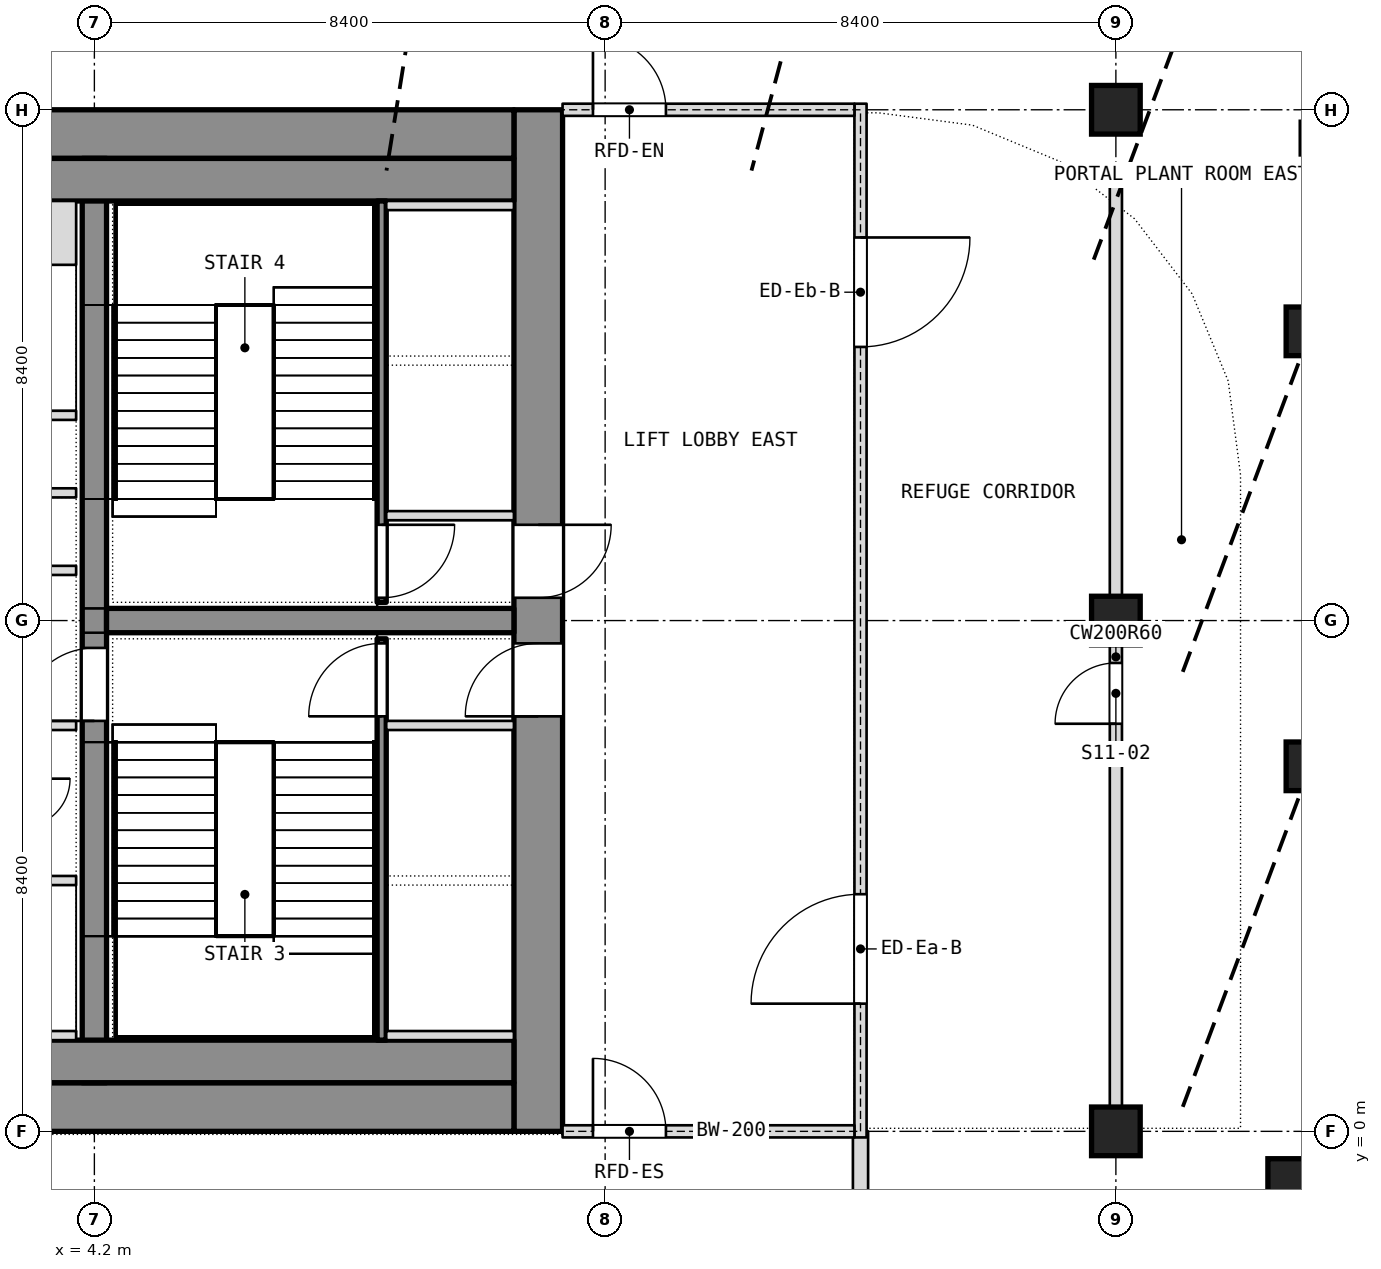
"""IFC4 building model, lengths in metres.
Left out: names, types, materials, properties, quantities, classifications, styles, units other than length and angle.
Written with IfcOpenShell. Run it as: python <this file> out.ifc"""

import sys

from ifc_helpers import new_model, si_unit, direction, frame, frame_2d, origin, origin_2d, place, context, subcontext, project, spatial, rectangle, i_section, extrude, element, fill, save


model = new_model("IFC4")
c1 = context("Model", 3, precision=1e-05, world=origin(), true_north=direction((0.0, 1.0)))
c2 = subcontext(c1, "Body", "Model", "MODEL_VIEW")
j1 = project(units=[si_unit("LENGTHUNIT", "METRE"), si_unit("PLANEANGLEUNIT", "RADIAN")], contexts=[c1])
p1 = place(None, origin())
s1 = spatial("IfcSite", under=j1, at=p1, CompositionType="ELEMENT")
p2 = place(p1, origin())
s2 = spatial("IfcBuilding", under=s1, at=p2, CompositionType="ELEMENT")
p3 = place(p2, frame((0.0, 0.0, 252.5)))
s3 = spatial("IfcBuildingStorey", under=s2, at=p3, CompositionType="ELEMENT", Elevation=252.5)
p4 = place(p3, frame((11.5, 0.0, 0.0), z_axis=(0.0, 0.0, 1.0), x_axis=(0.0, 1.0, 0.0)))
e1 = element("IfcWall", 1, at=p4, inside=s3, PredefinedType="SHEAR", context=c2, shape_type="SweptSolid", body=[
    extrude(rectangle(XDim=16.8, YDim=0.8, at=frame_2d((8.4, 0.0))), origin(), (0.0, 0.0, 1.0), 14.4),
])
p5 = place(p4, frame((6.825, 0.0, 0.0)))
e2 = element("IfcOpeningElement", 2, at=p5, cuts=e1, PredefinedType="OPENING", context=c2, shape_type="SweptSolid", body=[
    extrude(rectangle(XDim=1.2, YDim=2.1, at=frame_2d((0.6, 1.05))), frame((0.0, 0.4, 0.0), z_axis=(0.0, -1.0, 0.0), x_axis=(1.0, 0.0, 0.0)), (0.0, 0.0, 1.0), 0.8),
])
p6 = place(p4, frame((8.775, 0.0, 0.0)))
e3 = element("IfcOpeningElement", 3, at=p6, cuts=e1, PredefinedType="OPENING", context=c2, shape_type="SweptSolid", body=[
    extrude(rectangle(XDim=1.2, YDim=2.1, at=frame_2d((0.6, 1.05))), frame((0.0, 0.4, 0.0), z_axis=(0.0, -1.0, 0.0), x_axis=(1.0, 0.0, 0.0)), (0.0, 0.0, 1.0), 0.8),
])
p7 = place(p3, frame((-11.1, 0.4, 0.0), z_axis=(0.0, 0.0, 1.0), x_axis=(1.0, 0.0, 0.0)))
e4 = element("IfcWall", 4, at=p7, inside=s3, PredefinedType="SHEAR", context=c2, shape_type="SweptSolid", body=[
    extrude(rectangle(XDim=22.2, YDim=0.8, at=frame_2d((11.1, 0.0))), origin(), (0.0, 0.0, 1.0), 14.4),
])
p8 = place(p7, frame((10.85, 0.0, 0.0)))
e5 = element("IfcOpeningElement", 5, at=p8, cuts=e4, PredefinedType="OPENING", context=c2, shape_type="SweptSolid", body=[
    extrude(rectangle(XDim=1.4, YDim=2.1, at=frame_2d((0.7, 1.05))), frame((0.0, 0.4, 0.0), z_axis=(0.0, -1.0, 0.0), x_axis=(1.0, 0.0, 0.0)), (0.0, 0.0, 1.0), 0.8),
])
p9 = place(p3, frame((-11.1, 16.4, 0.0), z_axis=(0.0, 0.0, 1.0), x_axis=(1.0, 0.0, 0.0)))
e6 = element("IfcWall", 6, at=p9, inside=s3, PredefinedType="SHEAR", context=c2, shape_type="SweptSolid", body=[
    extrude(rectangle(XDim=22.2, YDim=0.8, at=frame_2d((11.1, 0.0))), origin(), (0.0, 0.0, 1.0), 14.4),
])
p10 = place(p9, frame((10.4, 0.0, 0.0)))
e7 = element("IfcOpeningElement", 7, at=p10, cuts=e6, PredefinedType="OPENING", context=c2, shape_type="SweptSolid", body=[
    extrude(rectangle(XDim=1.4, YDim=2.1, at=frame_2d((0.7, 1.05))), frame((0.0, 0.4, 0.0), z_axis=(0.0, -1.0, 0.0), x_axis=(1.0, 0.0, 0.0)), (0.0, 0.0, 1.0), 0.8),
])
p11 = place(p3, frame((4.2, 0.8, 0.0), z_axis=(0.0, 0.0, 1.0), x_axis=(0.0, 1.0, 0.0)))
e8 = element("IfcWall", 8, at=p11, inside=s3, PredefinedType="SHEAR", context=c2, shape_type="SweptSolid", body=[
    extrude(rectangle(XDim=15.2, YDim=0.4, at=frame_2d((7.6, 0.0))), origin(), (0.0, 0.0, 1.0), 14.4),
])
p12 = place(p11, frame((5.95, 0.0, 0.0)))
e9 = element("IfcOpeningElement", 9, at=p12, cuts=e8, PredefinedType="OPENING", context=c2, shape_type="SweptSolid", body=[
    extrude(rectangle(XDim=1.2, YDim=2.1, at=frame_2d((0.6, 1.05))), frame((0.0, 0.2, 0.0), z_axis=(0.0, -1.0, 0.0), x_axis=(1.0, 0.0, 0.0)), (0.0, 0.0, 1.0), 0.4),
])
p13 = place(p3, frame((4.4, 8.4, 0.0), z_axis=(0.0, 0.0, 1.0), x_axis=(1.0, 0.0, 0.0)))
e10 = element("IfcWall", 10, at=p13, inside=s3, PredefinedType="SHEAR", context=c2, shape_type="SweptSolid", body=[
    extrude(rectangle(XDim=6.7, YDim=0.4, at=frame_2d((3.35, 0.0))), origin(), (0.0, 0.0, 1.0), 14.4),
])
for number, where, z_axis, x_axis in (
    (11, (21.0, 0.0, 0.0), (0.0, 0.0, 1.0), (1.0, 0.0, 0.0)),
    (12, (21.0, 8.4, 0.0), (0.0, 0.0, 1.0), (1.0, 0.0, 0.0)),
    (13, (21.0, 16.8, 0.0), (0.0, 0.0, 1.0), (1.0, 0.0, 0.0)),
):
    element("IfcColumn", number, at=place(p3, frame(where, z_axis=z_axis, x_axis=x_axis)), inside=s3, PredefinedType="COLUMN", context=c2, shape_type="SweptSolid", body=[
        extrude(rectangle(XDim=0.8, YDim=0.8, at=origin_2d()), origin(), (0.0, 0.0, 1.0), 14.14),
    ])
p14 = place(p3, frame((24.2, 16.334, -0.3), z_axis=(0.0, 0.0, 1.0), x_axis=(1.0, 0.0, 0.0)))
e14 = element("IfcColumn", 14, at=p14, inside=s3, PredefinedType="COLUMN", context=c2, shape_type="SweptSolid", body=[
    extrude(i_section(OverallWidth=0.306, OverallDepth=0.524, WebThickness=0.024, FlangeThickness=0.04, FilletRadius=0.027, at=origin_2d()), origin(), (0.0, 0.0, 1.0), 14.04),
])
for number, where, z_axis, x_axis in (
    (15, (24.2, 13.156, 0.0), (0.0, 0.0, 1.0), (1.0, 0.0, 0.0)),
    (16, (24.2, 6.003, 0.0), (0.0, 0.0, 1.0), (1.0, 0.0, 0.0)),
    (17, (24.2, -1.15, 0.0), (0.0, 0.0, 1.0), (1.0, 0.0, 0.0)),
):
    element("IfcColumn", number, at=place(p3, frame(where, z_axis=z_axis, x_axis=x_axis)), inside=s3, PredefinedType="COLUMN", context=c2, shape_type="SweptSolid", body=[
        extrude(i_section(OverallWidth=0.306, OverallDepth=0.524, WebThickness=0.024, FlangeThickness=0.04, FilletRadius=0.027, at=origin_2d()), origin(), (0.0, 0.0, 1.0), 13.74),
    ])
p15 = place(p3, frame((21.0, 0.0, 0.0), z_axis=(0.0, 0.0, 1.0), x_axis=(0.0, 1.0, 0.0)))
e18 = element("IfcWall", 18, at=p15, inside=s3, PredefinedType="PARTITIONING", context=c2, shape_type="SweptSolid", body=[
    extrude(rectangle(XDim=15.606, YDim=0.2, at=frame_2d((7.803, 0.0))), origin(), (0.0, 0.0, 1.0), 13.74),
])
p16 = place(p15, frame((6.703, 0.0, 0.0)))
e19 = element("IfcOpeningElement", 19, at=p16, cuts=e18, PredefinedType="OPENING", context=c2, shape_type="SweptSolid", body=[
    extrude(rectangle(XDim=1.0, YDim=2.1, at=frame_2d((0.5, 1.05))), frame((0.0, 0.1, 0.0), z_axis=(0.0, -1.0, 0.0), x_axis=(1.0, 0.0, 0.0)), (0.0, 0.0, 1.0), 0.2),
])
p17 = place(p3, frame((16.8, 0.0, 0.0), z_axis=(0.0, 0.0, 1.0), x_axis=(0.0, -1.0, 0.0)))
e20 = element("IfcWall", 20, at=p17, inside=s3, PredefinedType="SOLIDWALL", context=c2, shape_type="SweptSolid", body=[
    extrude(rectangle(XDim=14.0, YDim=0.25, at=frame_2d((7.0, 0.0))), origin(), (0.0, 0.0, 1.0), 14.14),
])
p18 = place(p17, frame((1.467, 0.0, 1.0)))
e21 = element("IfcOpeningElement", 21, at=p18, cuts=e20, PredefinedType="OPENING", context=c2, shape_type="SweptSolid", body=[
    extrude(rectangle(XDim=4.8, YDim=3.0, at=frame_2d((2.4, 1.5))), frame((0.0, 0.125, 0.0), z_axis=(0.0, -1.0, 0.0), x_axis=(1.0, 0.0, 0.0)), (0.0, 0.0, 1.0), 0.25),
])
p19 = place(p17, frame((7.733, 0.0, 1.0)))
e22 = element("IfcOpeningElement", 22, at=p19, cuts=e20, PredefinedType="OPENING", context=c2, shape_type="SweptSolid", body=[
    extrude(rectangle(XDim=4.8, YDim=3.0, at=frame_2d((2.4, 1.5))), frame((0.0, 0.125, 0.0), z_axis=(0.0, -1.0, 0.0), x_axis=(1.0, 0.0, 0.0)), (0.0, 0.0, 1.0), 0.25),
])
p20 = place(p3, frame((1.15, 1.15, 0.0), z_axis=(0.0, 0.0, 1.0), x_axis=(1.0, 0.0, 0.0)))
e23 = element("IfcWall", 23, at=p20, inside=s3, PredefinedType="PARTITIONING", context=c2, shape_type="SweptSolid", body=[
    extrude(rectangle(XDim=9.95, YDim=0.7, at=frame_2d((4.975, 0.0))), origin(), (0.0, 0.0, 1.0), 14.14),
])
p21 = place(p3, frame((0.9, 15.65, 0.0), z_axis=(0.0, 0.0, 1.0), x_axis=(1.0, 0.0, 0.0)))
e24 = element("IfcWall", 24, at=p21, inside=s3, PredefinedType="PARTITIONING", context=c2, shape_type="SweptSolid", body=[
    extrude(rectangle(XDim=10.2, YDim=0.7, at=frame_2d((5.1, 0.0))), origin(), (0.0, 0.0, 1.0), 14.14),
])
p22 = place(p3, frame((8.925, 1.5, 0.0), z_axis=(0.0, 0.0, 1.0), x_axis=(0.0, 1.0, 0.0)))
e25 = element("IfcWall", 25, at=p22, inside=s3, PredefinedType="SHEAR", context=c2, shape_type="SweptSolid", body=[
    extrude(rectangle(XDim=6.6, YDim=0.15, at=frame_2d((3.3, 0.0))), origin(), (0.0, 0.0, 1.0), 14.14),
])
p23 = place(p22, frame((5.325, 0.0, 0.0)))
e26 = element("IfcOpeningElement", 26, at=p23, cuts=e25, PredefinedType="OPENING", context=c2, shape_type="SweptSolid", body=[
    extrude(rectangle(XDim=1.2, YDim=2.1, at=frame_2d((0.6, 1.05))), frame((0.0, 0.075, 0.0), z_axis=(0.0, -1.0, 0.0), x_axis=(1.0, 0.0, 0.0)), (0.0, 0.0, 1.0), 0.15),
])
for number, where, z_axis, x_axis in (
    (27, (9.0, 6.675, 0.0), (0.0, 0.0, 1.0), (1.0, 0.0, 0.0)),
    (28, (9.0, 1.575, 0.0), (0.0, 0.0, 1.0), (1.0, 0.0, 0.0)),
):
    element("IfcWall", number, at=place(p3, frame(where, z_axis=z_axis, x_axis=x_axis)), inside=s3, PredefinedType="SHEAR", context=c2, shape_type="SweptSolid", body=[
        extrude(rectangle(XDim=2.1, YDim=0.15, at=frame_2d((1.05, 0.0))), origin(), (0.0, 0.0, 1.0), 14.4),
    ])
p24 = place(p3, frame((8.925, 8.7, 0.0), z_axis=(0.0, 0.0, 1.0), x_axis=(0.0, 1.0, 0.0)))
e29 = element("IfcWall", 29, at=p24, inside=s3, PredefinedType="SHEAR", context=c2, shape_type="SweptSolid", body=[
    extrude(rectangle(XDim=6.6, YDim=0.15, at=frame_2d((3.3, 0.0))), origin(), (0.0, 0.0, 1.0), 14.14),
])
p25 = place(p24, frame((0.075, 0.0, 0.0)))
e30 = element("IfcOpeningElement", 30, at=p25, cuts=e29, PredefinedType="OPENING", context=c2, shape_type="SweptSolid", body=[
    extrude(rectangle(XDim=1.2, YDim=2.1, at=frame_2d((0.6, 1.05))), frame((0.0, 0.075, 0.0), z_axis=(0.0, -1.0, 0.0), x_axis=(1.0, 0.0, 0.0)), (0.0, 0.0, 1.0), 0.15),
])
for number, where, z_axis, x_axis in (
    (31, (9.0, 10.125, 0.0), (0.0, 0.0, 1.0), (1.0, 0.0, 0.0)),
    (32, (9.0, 15.225, 0.0), (0.0, 0.0, 1.0), (1.0, 0.0, 0.0)),
):
    element("IfcWall", number, at=place(p3, frame(where, z_axis=z_axis, x_axis=x_axis)), inside=s3, PredefinedType="SHEAR", context=c2, shape_type="SweptSolid", body=[
        extrude(rectangle(XDim=2.1, YDim=0.15, at=frame_2d((1.05, 0.0))), origin(), (0.0, 0.0, 1.0), 14.4),
    ])
p26 = place(p3, frame((-3.9, 4.125, 0.0), z_axis=(0.0, 0.0, 1.0), x_axis=(1.0, 0.0, 0.0)))
e33 = element("IfcWall", 33, at=p26, inside=s3, PredefinedType="PARTITIONING", context=c2, shape_type="SweptSolid", body=[
    extrude(rectangle(XDim=7.8, YDim=0.15, at=frame_2d((3.9, 0.0))), origin(), (0.0, 0.0, 1.0), 14.14),
])
p27 = place(p26, frame((3.75, 0.0, 0.0)))
e34 = element("IfcOpeningElement", 34, at=p27, cuts=e33, PredefinedType="OPENING", context=c2, shape_type="SweptSolid", body=[
    extrude(rectangle(XDim=1.2, YDim=2.1, at=frame_2d((0.6, 1.05))), frame((0.0, 0.075, 0.0), z_axis=(0.0, -1.0, 0.0), x_axis=(1.0, 0.0, 0.0)), (0.0, 0.0, 1.0), 0.15),
])
p28 = place(p3, frame((-3.9, 11.775, 0.0), z_axis=(0.0, 0.0, 1.0), x_axis=(1.0, 0.0, 0.0)))
e35 = element("IfcWall", 35, at=p28, inside=s3, PredefinedType="PARTITIONING", context=c2, shape_type="SweptSolid", body=[
    extrude(rectangle(XDim=7.8, YDim=0.15, at=frame_2d((3.9, 0.0))), origin(), (0.0, 0.0, 1.0), 14.14),
])
p29 = place(p28, frame((3.3, 0.0, 0.0)))
e36 = element("IfcOpeningElement", 36, at=p29, cuts=e35, PredefinedType="OPENING", context=c2, shape_type="SweptSolid", body=[
    extrude(rectangle(XDim=1.2, YDim=2.1, at=frame_2d((0.6, 1.05))), frame((0.0, 0.075, 0.0), z_axis=(0.0, -1.0, 0.0), x_axis=(1.0, 0.0, 0.0)), (0.0, 0.0, 1.0), 0.15),
])
p30 = place(p3, frame((1.65, 1.575, 0.0), z_axis=(0.0, 0.0, 1.0), x_axis=(1.0, 0.0, 0.0)))
e37 = element("IfcWall", 37, at=p30, inside=s3, PredefinedType="SHEAR", context=c2, shape_type="SweptSolid", body=[
    extrude(rectangle(XDim=2.25, YDim=0.15, at=frame_2d((1.125, 0.0))), origin(), (0.0, 0.0, 1.0), 14.4),
])
p31 = place(p3, frame((1.65, 14.775, 0.0), z_axis=(0.0, 0.0, 1.0), x_axis=(1.0, 0.0, 0.0)))
e38 = element("IfcWall", 38, at=p31, inside=s3, PredefinedType="SHEAR", context=c2, shape_type="SweptSolid", body=[
    extrude(rectangle(XDim=2.25, YDim=1.05, at=frame_2d((1.125, 0.0))), origin(), (0.0, 0.0, 1.0), 14.4),
])
for number, where, z_axis, x_axis in (
    (39, (1.65, 6.675, 0.0), (0.0, 0.0, 1.0), (1.0, 0.0, 0.0)),
    (40, (1.65, 9.225, 0.0), (0.0, 0.0, 1.0), (1.0, 0.0, 0.0)),
):
    element("IfcWall", number, at=place(p3, frame(where, z_axis=z_axis, x_axis=x_axis)), inside=s3, PredefinedType="PARTITIONING", context=c2, shape_type="SweptSolid", body=[
        extrude(rectangle(XDim=2.25, YDim=0.15, at=frame_2d((1.125, 0.0))), origin(), (0.0, 0.0, 1.0), 14.14),
    ])
p32 = place(p3, frame((1.8, 10.5, 0.0), z_axis=(0.0, 0.0, 1.0), x_axis=(1.0, 0.0, 0.0)))
e41 = element("IfcWall", 41, at=p32, inside=s3, PredefinedType="PARTITIONING", context=c2, shape_type="SweptSolid", body=[
    extrude(rectangle(XDim=2.1, YDim=0.15, at=frame_2d((1.05, 0.0))), origin(), (0.0, 0.0, 1.0), 14.14),
])
p33 = place(p3, frame((16.8, -0.1, 0.0), z_axis=(0.0, 0.0, 1.0), x_axis=(0.0, 1.0, 0.0)))
e42 = element("IfcWall", 42, at=p33, inside=s3, PredefinedType="PARTITIONING", context=c2, shape_type="SweptSolid", body=[
    extrude(rectangle(XDim=17.0, YDim=0.2, at=frame_2d((8.5, 0.0))), origin(), (0.0, 0.0, 1.0), 13.74),
])
p34 = place(p33, frame((2.2, 0.0, 0.0)))
e43 = element("IfcOpeningElement", 43, at=p34, cuts=e42, PredefinedType="OPENING", context=c2, shape_type="SweptSolid", body=[
    extrude(rectangle(XDim=1.8, YDim=2.1, at=frame_2d((0.9, 1.05))), frame((0.0, 0.1, 0.0), z_axis=(0.0, -1.0, 0.0), x_axis=(1.0, 0.0, 0.0)), (0.0, 0.0, 1.0), 0.2),
])
p35 = place(p33, frame((13.0, 0.0, 0.0)))
e44 = element("IfcOpeningElement", 44, at=p35, cuts=e42, PredefinedType="OPENING", context=c2, shape_type="SweptSolid", body=[
    extrude(rectangle(XDim=1.8, YDim=2.1, at=frame_2d((0.9, 1.05))), frame((0.0, 0.1, 0.0), z_axis=(0.0, -1.0, 0.0), x_axis=(1.0, 0.0, 0.0)), (0.0, 0.0, 1.0), 0.2),
])
p36 = place(p3, frame((11.9, 0.0, 0.0), z_axis=(0.0, 0.0, 1.0), x_axis=(1.0, 0.0, 0.0)))
e45 = element("IfcWall", 45, at=p36, inside=s3, PredefinedType="PARTITIONING", context=c2, shape_type="SweptSolid", body=[
    extrude(rectangle(XDim=4.8, YDim=0.2, at=frame_2d((2.4, 0.0))), origin(), (0.0, 0.0, 1.0), 13.8),
])
p37 = place(p36, frame((0.5, 0.0, 0.0)))
e46 = element("IfcOpeningElement", 46, at=p37, cuts=e45, PredefinedType="OPENING", context=c2, shape_type="SweptSolid", body=[
    extrude(rectangle(XDim=1.2, YDim=2.1, at=frame_2d((0.6, 1.05))), frame((0.0, 0.1, 0.0), z_axis=(0.0, -1.0, 0.0), x_axis=(1.0, 0.0, 0.0)), (0.0, 0.0, 1.0), 0.2),
])
p38 = place(p3, frame((11.9, 16.8, 0.0), z_axis=(0.0, 0.0, 1.0), x_axis=(1.0, 0.0, 0.0)))
e47 = element("IfcWall", 47, at=p38, inside=s3, PredefinedType="PARTITIONING", context=c2, shape_type="SweptSolid", body=[
    extrude(rectangle(XDim=4.8, YDim=0.2, at=frame_2d((2.4, 0.0))), origin(), (0.0, 0.0, 1.0), 14.14),
])
p39 = place(p38, frame((0.5, 0.0, 0.0)))
e48 = element("IfcOpeningElement", 48, at=p39, cuts=e47, PredefinedType="OPENING", context=c2, shape_type="SweptSolid", body=[
    extrude(rectangle(XDim=1.2, YDim=2.1, at=frame_2d((0.6, 1.05))), frame((0.0, 0.1, 0.0), z_axis=(0.0, -1.0, 0.0), x_axis=(1.0, 0.0, 0.0)), (0.0, 0.0, 1.0), 0.2),
])
p40 = place(p16, origin())
e49 = element("IfcDoor", 49, at=p40, inside=s3, OperationType="SINGLE_SWING_RIGHT", PredefinedType="DOOR", context=c2, shape_type="SweptSolid", body=[
    extrude(rectangle(XDim=1.0, YDim=2.1, at=frame_2d((0.5, 1.05))), frame((0.0, 0.025, 0.0), z_axis=(0.0, -1.0, 0.0), x_axis=(1.0, 0.0, 0.0)), (0.0, 0.0, 1.0), 0.05),
])
fill(e19, e49)
p41 = place(p5, origin())
e50 = element("IfcDoor", 50, at=p41, inside=s3, OperationType="SINGLE_SWING_LEFT", PredefinedType="DOOR", context=c2, shape_type="SweptSolid", body=[
    extrude(rectangle(XDim=1.2, YDim=2.1, at=frame_2d((0.6, 1.05))), frame((0.0, 0.025, 0.0), z_axis=(0.0, -1.0, 0.0), x_axis=(1.0, 0.0, 0.0)), (0.0, 0.0, 1.0), 0.05),
])
fill(e2, e50)
p42 = place(p23, origin())
e51 = element("IfcDoor", 51, at=p42, inside=s3, OperationType="SINGLE_SWING_LEFT", PredefinedType="DOOR", context=c2, shape_type="SweptSolid", body=[
    extrude(rectangle(XDim=1.2, YDim=2.1, at=frame_2d((0.6, 1.05))), frame((0.0, 0.025, 0.0), z_axis=(0.0, -1.0, 0.0), x_axis=(1.0, 0.0, 0.0)), (0.0, 0.0, 1.0), 0.05),
])
fill(e26, e51)
p43 = place(p6, origin())
e52 = element("IfcDoor", 52, at=p43, inside=s3, OperationType="SINGLE_SWING_LEFT", PredefinedType="DOOR", context=c2, shape_type="SweptSolid", body=[
    extrude(rectangle(XDim=1.2, YDim=2.1, at=frame_2d((0.6, 1.05))), frame((0.0, 0.025, 0.0), z_axis=(0.0, -1.0, 0.0), x_axis=(1.0, 0.0, 0.0)), (0.0, 0.0, 1.0), 0.05),
])
fill(e3, e52)
p44 = place(p25, origin())
e53 = element("IfcDoor", 53, at=p44, inside=s3, OperationType="SINGLE_SWING_LEFT", PredefinedType="DOOR", context=c2, shape_type="SweptSolid", body=[
    extrude(rectangle(XDim=1.2, YDim=2.1, at=frame_2d((0.6, 1.05))), frame((0.0, 0.025, 0.0), z_axis=(0.0, -1.0, 0.0), x_axis=(1.0, 0.0, 0.0)), (0.0, 0.0, 1.0), 0.05),
])
fill(e30, e53)
p45 = place(p12, origin())
e54 = element("IfcDoor", 54, at=p45, inside=s3, OperationType="SINGLE_SWING_LEFT", PredefinedType="DOOR", context=c2, shape_type="SweptSolid", body=[
    extrude(rectangle(XDim=1.2, YDim=2.1, at=frame_2d((0.6, 1.05))), frame((0.0, 0.025, 0.0), z_axis=(0.0, -1.0, 0.0), x_axis=(1.0, 0.0, 0.0)), (0.0, 0.0, 1.0), 0.05),
])
fill(e9, e54)
p46 = place(p34, origin())
e55 = element("IfcDoor", 55, at=p46, inside=s3, OperationType="DOUBLE_DOOR_SINGLE_SWING", PredefinedType="DOOR", context=c2, shape_type="SweptSolid", body=[
    extrude(rectangle(XDim=1.8, YDim=2.1, at=frame_2d((0.9, 1.05))), frame((0.0, 0.025, 0.0), z_axis=(0.0, -1.0, 0.0), x_axis=(1.0, 0.0, 0.0)), (0.0, 0.0, 1.0), 0.05),
])
fill(e43, e55)
p47 = place(p35, origin())
e56 = element("IfcDoor", 56, at=p47, inside=s3, OperationType="DOUBLE_DOOR_SINGLE_SWING", PredefinedType="DOOR", context=c2, shape_type="SweptSolid", body=[
    extrude(rectangle(XDim=1.8, YDim=2.1, at=frame_2d((0.9, 1.05))), frame((0.0, 0.025, 0.0), z_axis=(0.0, -1.0, 0.0), x_axis=(1.0, 0.0, 0.0)), (0.0, 0.0, 1.0), 0.05),
])
fill(e44, e56)
p48 = place(p37, origin())
e57 = element("IfcDoor", 57, at=p48, inside=s3, OperationType="SINGLE_SWING_LEFT", PredefinedType="DOOR", context=c2, shape_type="SweptSolid", body=[
    extrude(rectangle(XDim=1.2, YDim=2.1, at=frame_2d((0.6, 1.05))), frame((0.0, 0.025, 0.0), z_axis=(0.0, -1.0, 0.0), x_axis=(1.0, 0.0, 0.0)), (0.0, 0.0, 1.0), 0.05),
])
fill(e46, e57)
p49 = place(p39, origin())
e58 = element("IfcDoor", 58, at=p49, inside=s3, OperationType="SINGLE_SWING_LEFT", PredefinedType="DOOR", context=c2, shape_type="SweptSolid", body=[
    extrude(rectangle(XDim=1.2, YDim=2.1, at=frame_2d((0.6, 1.05))), frame((0.0, 0.025, 0.0), z_axis=(0.0, -1.0, 0.0), x_axis=(1.0, 0.0, 0.0)), (0.0, 0.0, 1.0), 0.05),
])
fill(e48, e58)
save(model, sys.argv[1])
